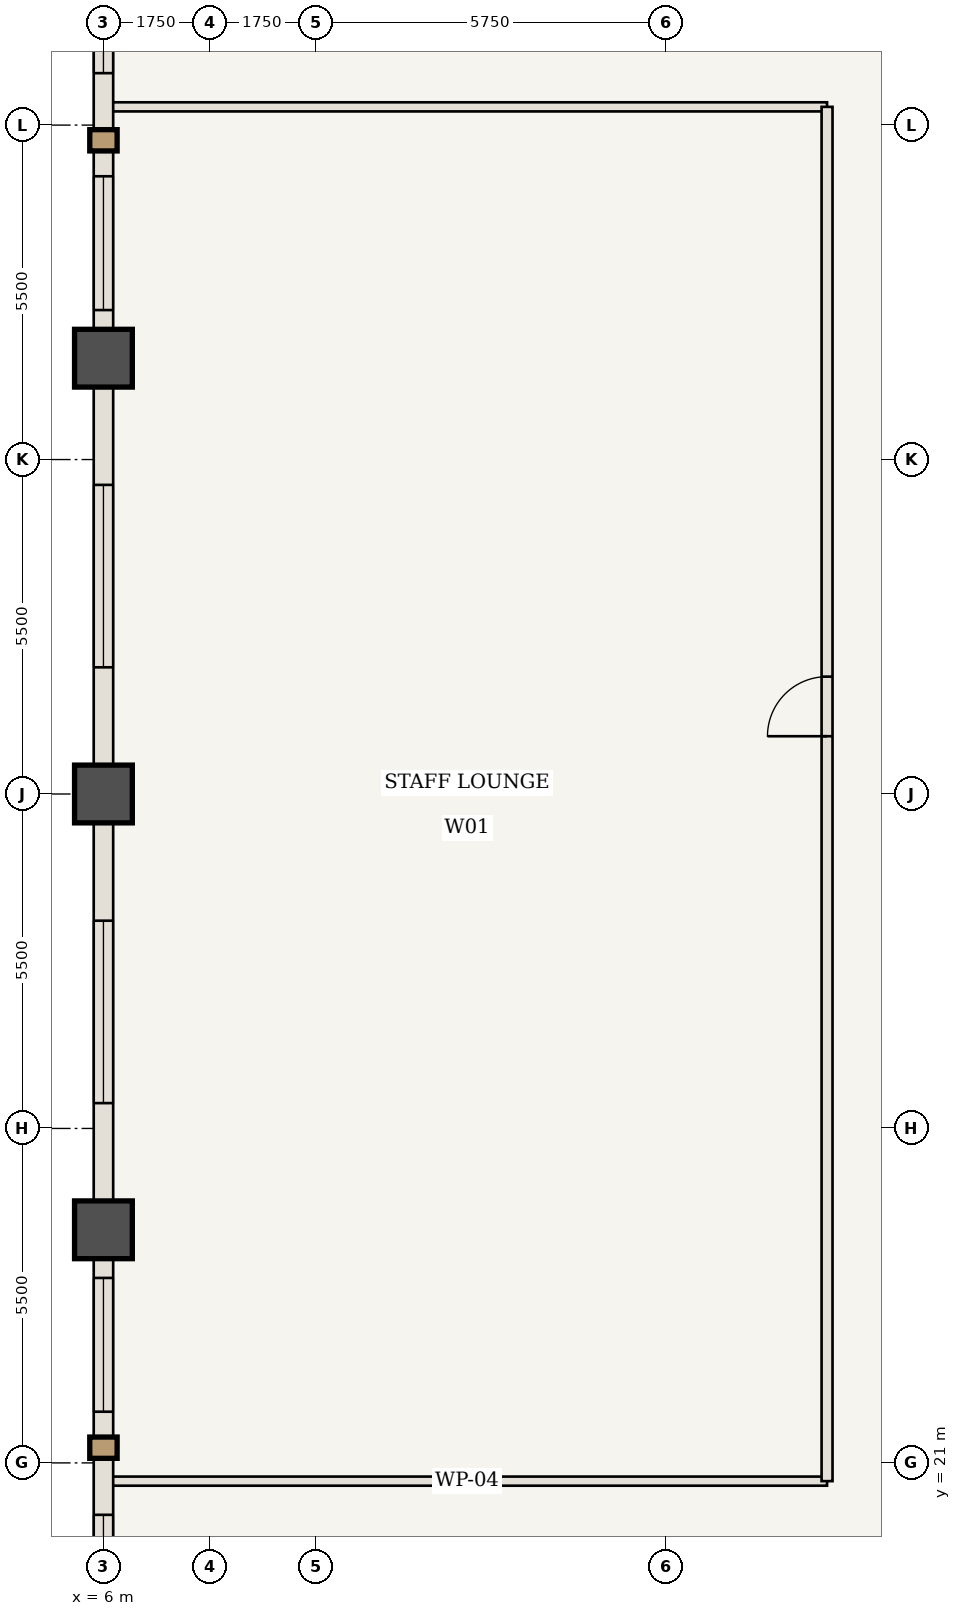
"""IFC4 building model, lengths in metres.
Left out: names, types, materials, properties, quantities, classifications, styles, units other than length and angle.
Written with IfcOpenShell. Run it as: python <this file> out.ifc"""

import sys

from ifc_helpers import new_model, si_unit, direction, frame, frame_2d, origin, origin_2d, place, context, subcontext, project, spatial, rectangle, extrude, element, fill, save


model = new_model("IFC4")
c1 = context("Model", 3, precision=1e-05, world=origin(), true_north=direction((0.0, 1.0)))
c2 = subcontext(c1, "Body", "Model", "MODEL_VIEW")
j1 = project(units=[si_unit("LENGTHUNIT", "METRE"), si_unit("PLANEANGLEUNIT", "RADIAN")], contexts=[c1])
p1 = place(None, origin())
s1 = spatial("IfcSite", under=j1, at=p1, CompositionType="ELEMENT")
p2 = place(p1, origin())
s2 = spatial("IfcBuilding", under=s1, at=p2, CompositionType="ELEMENT")
p3 = place(p2, frame((0.0, 0.0, 152.95)))
s3 = spatial("IfcBuildingStorey", under=s2, at=p3, CompositionType="ELEMENT", Elevation=152.95)
for number, where, z_axis, x_axis in (
    (1, (6.0, 24.833, 0.0), (0.0, 0.0, 1.0), (1.0, 0.0, 0.0)),
    (2, (6.0, 32.0, 0.0), (0.0, 0.0, 1.0), (1.0, 0.0, 0.0)),
    (3, (6.0, 39.167, 0.0), (0.0, 0.0, 1.0), (1.0, 0.0, 0.0)),
):
    element("IfcColumn", number, at=place(p3, frame(where, z_axis=z_axis, x_axis=x_axis)), inside=s3, PredefinedType="COLUMN", context=c2, shape_type="SweptSolid", body=[
        extrude(rectangle(XDim=0.95, YDim=0.95, at=origin_2d()), origin(), (0.0, 0.0, 1.0), 3.85),
    ])
for number, where, z_axis, x_axis in (
    (4, (6.06, 20.7, 0.0), (0.0, 0.0, 1.0), (1.0, 0.0, 0.0)),
    (5, (6.06, 43.3, 0.0), (0.0, 0.0, 1.0), (1.0, 0.0, 0.0)),
):
    element("IfcWall", number, at=place(p3, frame(where, z_axis=z_axis, x_axis=x_axis)), inside=s3, PredefinedType="STANDARD", context=c2, shape_type="SweptSolid", body=[
        extrude(rectangle(XDim=11.84, YDim=0.15, at=frame_2d((5.92, 0.0))), origin(), (0.0, 0.0, 1.0), 3.065),
    ])
p4 = place(p3, frame((17.9, 20.7, 0.0), z_axis=(0.0, 0.0, 1.0), x_axis=(0.0, 1.0, 0.0)))
e6 = element("IfcWall", 6, at=p4, inside=s3, PredefinedType="STANDARD", context=c2, shape_type="SweptSolid", body=[
    extrude(rectangle(XDim=22.6, YDim=0.18, at=frame_2d((11.3, 0.0))), origin(), (0.0, 0.0, 1.0), 3.685),
])
p5 = place(p4, frame((12.25, 0.0, 0.0)))
e7 = element("IfcOpeningElement", 7, at=p5, cuts=e6, PredefinedType="OPENING", context=c2, shape_type="SweptSolid", body=[
    extrude(rectangle(XDim=0.98, YDim=2.2, at=frame_2d((0.49, 1.1))), frame((0.0, 0.1, 0.0), z_axis=(0.0, -1.0, 0.0), x_axis=(1.0, 0.0, 0.0)), (0.0, 0.0, 1.0), 0.2),
])
p6 = place(p3, frame((6.0, 17.667, 0.0), z_axis=(0.0, 0.0, 1.0), x_axis=(0.0, 1.0, 0.0)))
e8 = element("IfcWall", 8, at=p6, inside=s3, PredefinedType="USERDEFINED", context=c2, shape_type="SweptSolid", body=[
    extrude(rectangle(XDim=7.167, YDim=0.32, at=frame_2d((3.583, 0.0))), origin(), (0.0, 0.0, 1.0), 2.885),
])
p7 = place(p6, frame((0.879, 0.0, 0.85)))
e9 = element("IfcOpeningElement", 9, at=p7, cuts=e8, PredefinedType="OPENING", context=c2, shape_type="SweptSolid", body=[
    extrude(rectangle(XDim=1.6, YDim=1.835, at=frame_2d((0.8, 0.917))), frame((0.0, 0.17, 0.0), z_axis=(0.0, -1.0, 0.0), x_axis=(1.0, 0.0, 0.0)), (0.0, 0.0, 1.0), 0.34),
])
p8 = place(p6, frame((4.175, 0.0, 0.85)))
e10 = element("IfcOpeningElement", 10, at=p8, cuts=e8, PredefinedType="OPENING", context=c2, shape_type="SweptSolid", body=[
    extrude(rectangle(XDim=2.2, YDim=1.835, at=frame_2d((1.1, 0.917))), frame((0.0, 0.17, 0.0), z_axis=(0.0, -1.0, 0.0), x_axis=(1.0, 0.0, 0.0)), (0.0, 0.0, 1.0), 0.34),
])
p9 = place(p3, frame((6.0, 24.833, 0.0), z_axis=(0.0, 0.0, 1.0), x_axis=(0.0, 1.0, 0.0)))
e11 = element("IfcWall", 11, at=p9, inside=s3, PredefinedType="USERDEFINED", context=c2, shape_type="SweptSolid", body=[
    extrude(rectangle(XDim=7.167, YDim=0.32, at=frame_2d((3.583, 0.0))), origin(), (0.0, 0.0, 1.0), 2.885),
])
p10 = place(p9, frame((2.083, 0.0, 0.85)))
e12 = element("IfcOpeningElement", 12, at=p10, cuts=e11, PredefinedType="OPENING", context=c2, shape_type="SweptSolid", body=[
    extrude(rectangle(XDim=3.0, YDim=1.835, at=frame_2d((1.5, 0.917))), frame((0.0, 0.17, 0.0), z_axis=(0.0, -1.0, 0.0), x_axis=(1.0, 0.0, 0.0)), (0.0, 0.0, 1.0), 0.34),
])
p11 = place(p3, frame((6.0, 32.0, 0.0), z_axis=(0.0, 0.0, 1.0), x_axis=(0.0, 1.0, 0.0)))
e13 = element("IfcWall", 13, at=p11, inside=s3, PredefinedType="USERDEFINED", context=c2, shape_type="SweptSolid", body=[
    extrude(rectangle(XDim=7.167, YDim=0.32, at=frame_2d((3.583, 0.0))), origin(), (0.0, 0.0, 1.0), 2.885),
])
p12 = place(p11, frame((2.083, 0.0, 0.85)))
e14 = element("IfcOpeningElement", 14, at=p12, cuts=e13, PredefinedType="OPENING", context=c2, shape_type="SweptSolid", body=[
    extrude(rectangle(XDim=3.0, YDim=1.835, at=frame_2d((1.5, 0.917))), frame((0.0, 0.17, 0.0), z_axis=(0.0, -1.0, 0.0), x_axis=(1.0, 0.0, 0.0)), (0.0, 0.0, 1.0), 0.34),
])
p13 = place(p3, frame((6.0, 39.167, 0.0), z_axis=(0.0, 0.0, 1.0), x_axis=(0.0, 1.0, 0.0)))
e15 = element("IfcWall", 15, at=p13, inside=s3, PredefinedType="USERDEFINED", context=c2, shape_type="SweptSolid", body=[
    extrude(rectangle(XDim=7.167, YDim=0.32, at=frame_2d((3.583, 0.0))), origin(), (0.0, 0.0, 1.0), 2.885),
])
p14 = place(p13, frame((0.792, 0.0, 0.85)))
e16 = element("IfcOpeningElement", 16, at=p14, cuts=e15, PredefinedType="OPENING", context=c2, shape_type="SweptSolid", body=[
    extrude(rectangle(XDim=2.2, YDim=1.835, at=frame_2d((1.1, 0.917))), frame((0.0, 0.17, 0.0), z_axis=(0.0, -1.0, 0.0), x_axis=(1.0, 0.0, 0.0)), (0.0, 0.0, 1.0), 0.34),
])
p15 = place(p13, frame((4.688, 0.0, 0.85)))
e17 = element("IfcOpeningElement", 17, at=p15, cuts=e15, PredefinedType="OPENING", context=c2, shape_type="SweptSolid", body=[
    extrude(rectangle(XDim=1.6, YDim=1.835, at=frame_2d((0.8, 0.917))), frame((0.0, 0.17, 0.0), z_axis=(0.0, -1.0, 0.0), x_axis=(1.0, 0.0, 0.0)), (0.0, 0.0, 1.0), 0.34),
])
p16 = place(p5, origin())
e18 = element("IfcDoor", 18, at=p16, inside=s3, OperationType="SINGLE_SWING_LEFT", PredefinedType="DOOR", context=c2, shape_type="SweptSolid", body=[
    extrude(rectangle(XDim=0.98, YDim=2.2, at=frame_2d((0.49, 1.1))), frame((0.0, 0.025, 0.0), z_axis=(0.0, -1.0, 0.0), x_axis=(1.0, 0.0, 0.0)), (0.0, 0.0, 1.0), 0.05),
])
fill(e7, e18)
p17 = place(p7, origin())
e19 = element("IfcWindow", 19, at=p17, inside=s3, PartitioningType="SINGLE_PANEL", PredefinedType="WINDOW", context=c2, shape_type="SweptSolid", body=[
    extrude(rectangle(XDim=1.6, YDim=1.835, at=frame_2d((0.8, 0.917))), frame((0.0, 0.03, 0.0), z_axis=(0.0, -1.0, 0.0), x_axis=(1.0, 0.0, 0.0)), (0.0, 0.0, 1.0), 0.06),
])
fill(e9, e19)
p18 = place(p8, origin())
e20 = element("IfcWindow", 20, at=p18, inside=s3, PartitioningType="SINGLE_PANEL", PredefinedType="WINDOW", context=c2, shape_type="SweptSolid", body=[
    extrude(rectangle(XDim=2.2, YDim=1.835, at=frame_2d((1.1, 0.917))), frame((0.0, 0.03, 0.0), z_axis=(0.0, -1.0, 0.0), x_axis=(1.0, 0.0, 0.0)), (0.0, 0.0, 1.0), 0.06),
])
fill(e10, e20)
p19 = place(p10, origin())
e21 = element("IfcWindow", 21, at=p19, inside=s3, PartitioningType="SINGLE_PANEL", PredefinedType="WINDOW", context=c2, shape_type="SweptSolid", body=[
    extrude(rectangle(XDim=3.0, YDim=1.835, at=frame_2d((1.5, 0.917))), frame((0.0, 0.03, 0.0), z_axis=(0.0, -1.0, 0.0), x_axis=(1.0, 0.0, 0.0)), (0.0, 0.0, 1.0), 0.06),
])
fill(e12, e21)
p20 = place(p12, origin())
e22 = element("IfcWindow", 22, at=p20, inside=s3, PartitioningType="SINGLE_PANEL", PredefinedType="WINDOW", context=c2, shape_type="SweptSolid", body=[
    extrude(rectangle(XDim=3.0, YDim=1.835, at=frame_2d((1.5, 0.917))), frame((0.0, 0.03, 0.0), z_axis=(0.0, -1.0, 0.0), x_axis=(1.0, 0.0, 0.0)), (0.0, 0.0, 1.0), 0.06),
])
fill(e14, e22)
p21 = place(p14, origin())
e23 = element("IfcWindow", 23, at=p21, inside=s3, PartitioningType="SINGLE_PANEL", PredefinedType="WINDOW", context=c2, shape_type="SweptSolid", body=[
    extrude(rectangle(XDim=2.2, YDim=1.835, at=frame_2d((1.1, 0.917))), frame((0.0, 0.03, 0.0), z_axis=(0.0, -1.0, 0.0), x_axis=(1.0, 0.0, 0.0)), (0.0, 0.0, 1.0), 0.06),
])
fill(e16, e23)
p22 = place(p15, origin())
e24 = element("IfcWindow", 24, at=p22, inside=s3, PartitioningType="SINGLE_PANEL", PredefinedType="WINDOW", context=c2, shape_type="SweptSolid", body=[
    extrude(rectangle(XDim=1.6, YDim=1.835, at=frame_2d((0.8, 0.917))), frame((0.0, 0.03, 0.0), z_axis=(0.0, -1.0, 0.0), x_axis=(1.0, 0.0, 0.0)), (0.0, 0.0, 1.0), 0.06),
])
fill(e17, e24)
save(model, sys.argv[1])
